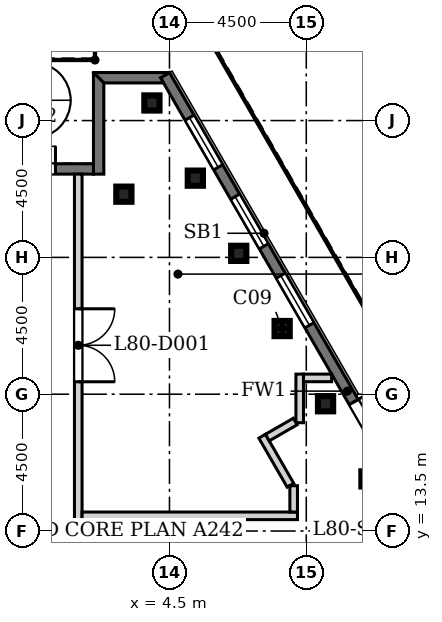
"""IFC4 building model, lengths in metres.
Left out: names, types, materials, properties, quantities, classifications, styles, units other than length and angle.
Written with IfcOpenShell. Run it as: python <this file> out.ifc"""

import sys

from ifc_helpers import new_model, si_unit, direction, frame, frame_2d, origin, origin_2d, place, context, subcontext, project, spatial, polyline, rectangle, hollow_rectangle, outline, extrude, element, fill, save


model = new_model("IFC4")
c1 = context("Model", 3, precision=1e-05, world=origin(), true_north=direction((0.0, 1.0)))
c2 = subcontext(c1, "Body", "Model", "MODEL_VIEW")
j1 = project(units=[si_unit("LENGTHUNIT", "METRE"), si_unit("PLANEANGLEUNIT", "RADIAN")], contexts=[c1])
p1 = place(None, origin())
s1 = spatial("IfcSite", under=j1, at=p1, CompositionType="ELEMENT")
p2 = place(p1, origin())
s2 = spatial("IfcBuilding", under=s1, at=p2, CompositionType="ELEMENT")
p3 = place(p2, frame((0.0, 0.0, 355.1)))
s3 = spatial("IfcBuildingStorey", under=s2, at=p3, CompositionType="ELEMENT", Elevation=355.1)
for number, where, z_axis, x_axis in (
    (1, (11.062, 15.213, 0.0), (0.0, 0.0, 1.0), (1.0, 0.0, 0.0)),
    (2, (9.634, 17.687, 0.0), (0.0, 0.0, 1.0), (1.0, 0.0, 0.0)),
    (3, (8.206, 20.16, 0.0), (0.0, 0.0, 1.0), (1.0, 0.0, 0.0)),
    (4, (6.778, 22.633, 0.0), (0.0, 0.0, 1.0), (1.0, 0.0, 0.0)),
    (5, (5.351, 25.106, 0.0), (0.0, 0.0, 1.0), (1.0, 0.0, 0.0)),
    (6, (3.923, 27.579, 0.0), (0.0, 0.0, 1.0), (1.0, 0.0, 0.0)),
    (7, (3.0, 24.579, 0.0), (0.0, 0.0, 1.0), (1.0, 0.0, 0.0)),
):
    element("IfcColumn", number, at=place(p3, frame(where, z_axis=z_axis, x_axis=x_axis)), inside=s3, PredefinedType="COLUMN", context=c2, shape_type="SweptSolid", body=[
        extrude(hollow_rectangle(XDim=0.5, YDim=0.5, WallThickness=0.025, at=origin_2d()), origin(), (0.0, 0.0, 1.0), 3.9),
    ])
p4 = place(p3, frame((16.353, 7.709, 0.0), z_axis=(0.0, 0.0, 1.0), x_axis=(-0.49999894854, 0.866026010844, 0.0)))
e8 = element("IfcWall", 8, at=p4, inside=s3, PredefinedType="SOLIDWALL", context=c2, shape_type="SweptSolid", body=[
    extrude(rectangle(XDim=24.0, YDim=0.34, at=frame_2d((12.0, 0.0))), origin(), (0.0, 0.0, 1.0), 3.9),
])
p5 = place(p4, frame((2.5, 0.0, 0.9)))
e9 = element("IfcOpeningElement", 9, at=p5, cuts=e8, PredefinedType="OPENING", context=c2, shape_type="SweptSolid", body=[
    extrude(rectangle(XDim=1.885, YDim=3.0, at=frame_2d((0.942, 1.5))), frame((0.0, 0.18, 0.0), z_axis=(0.0, -1.0, 0.0), x_axis=(1.0, 0.0, 0.0)), (0.0, 0.0, 1.0), 0.36),
])
p6 = place(p4, frame((5.5, 0.0, 0.9)))
e10 = element("IfcOpeningElement", 10, at=p6, cuts=e8, PredefinedType="OPENING", context=c2, shape_type="SweptSolid", body=[
    extrude(rectangle(XDim=1.885, YDim=3.0, at=frame_2d((0.942, 1.5))), frame((0.0, 0.18, 0.0), z_axis=(0.0, -1.0, 0.0), x_axis=(1.0, 0.0, 0.0)), (0.0, 0.0, 1.0), 0.36),
])
p7 = place(p4, frame((14.5, 0.0, 0.9)))
e11 = element("IfcOpeningElement", 11, at=p7, cuts=e8, PredefinedType="OPENING", context=c2, shape_type="SweptSolid", body=[
    extrude(rectangle(XDim=1.885, YDim=3.0, at=frame_2d((0.942, 1.5))), frame((0.0, 0.18, 0.0), z_axis=(0.0, -1.0, 0.0), x_axis=(1.0, 0.0, 0.0)), (0.0, 0.0, 1.0), 0.36),
])
p8 = place(p4, frame((17.5, 0.0, 0.9)))
e12 = element("IfcOpeningElement", 12, at=p8, cuts=e8, PredefinedType="OPENING", context=c2, shape_type="SweptSolid", body=[
    extrude(rectangle(XDim=1.885, YDim=3.0, at=frame_2d((0.942, 1.5))), frame((0.0, 0.18, 0.0), z_axis=(0.0, -1.0, 0.0), x_axis=(1.0, 0.0, 0.0)), (0.0, 0.0, 1.0), 0.36),
])
p9 = place(p4, frame((20.5, 0.0, 0.9)))
e13 = element("IfcOpeningElement", 13, at=p9, cuts=e8, PredefinedType="OPENING", context=c2, shape_type="SweptSolid", body=[
    extrude(rectangle(XDim=1.885, YDim=3.0, at=frame_2d((0.942, 1.5))), frame((0.0, 0.18, 0.0), z_axis=(0.0, -1.0, 0.0), x_axis=(1.0, 0.0, 0.0)), (0.0, 0.0, 1.0), 0.36),
])
p10 = place(p4, frame((9.7, 0.0, 0.0)))
e14 = element("IfcOpeningElement", 14, at=p10, cuts=e8, PredefinedType="OPENING", context=c2, shape_type="SweptSolid", body=[
    extrude(rectangle(XDim=1.885, YDim=2.6, at=frame_2d((0.942, 1.3))), frame((0.0, 0.18, 0.0), z_axis=(0.0, -1.0, 0.0), x_axis=(1.0, 0.0, 0.0)), (0.0, 0.0, 1.0), 0.36),
])
p11 = place(p3, origin())
e15 = element("IfcWall", 15, at=p11, inside=s3, PredefinedType="SOLIDWALL", context=c2, shape_type="SweptSolid", body=[
    extrude(outline(polyline([(1.999, 28.579), (4.501, 28.579), (4.501, 28.579), (4.206, 28.409), (4.305, 28.238), (2.34, 28.238), (1.999, 28.579), (1.999, 28.579)])), origin(), (0.0, 0.0, 1.0), 3.9),
])
p12 = place(p3, origin())
e16 = element("IfcWall", 16, at=p12, inside=s3, PredefinedType="SOLIDWALL", context=c2, shape_type="SweptSolid", body=[
    extrude(outline(polyline([(2.341, 25.238), (2.0, 25.238), (2.0, 28.58), (2.0, 28.58), (2.341, 28.239), (2.341, 25.238)])), origin(), (0.0, 0.0, 1.0), 3.9),
])
p13 = place(p3, frame((2.0, 25.409, 0.0), z_axis=(0.0, 0.0, 1.0), x_axis=(-1.0, 0.0, 0.0)))
e17 = element("IfcWall", 17, at=p13, inside=s3, PredefinedType="SOLIDWALL", context=c2, shape_type="SweptSolid", body=[
    extrude(rectangle(XDim=4.0, YDim=0.34, at=frame_2d((2.0, 0.0))), origin(), (0.0, 0.0, 1.0), 3.9),
])
p14 = place(p13, frame((1.25, 0.0, 0.0)))
e18 = element("IfcOpeningElement", 18, at=p14, cuts=e17, PredefinedType="OPENING", context=c2, shape_type="SweptSolid", body=[
    extrude(rectangle(XDim=1.5, YDim=2.4, at=frame_2d((0.75, 1.2))), frame((0.0, 0.18, 0.0), z_axis=(0.0, -1.0, 0.0), x_axis=(1.0, 0.0, 0.0)), (0.0, 0.0, 1.0), 0.36),
])
p15 = place(p3, frame((1.5, 25.239, 0.0), z_axis=(0.0, 0.0, 1.0), x_axis=(0.0, -1.0, 0.0)))
e19 = element("IfcWall", 19, at=p15, inside=s3, PredefinedType="SOLIDWALL", context=c2, shape_type="SweptSolid", body=[
    extrude(rectangle(XDim=11.364, YDim=0.25, at=frame_2d((5.682, 0.0))), origin(), (0.0, 0.0, 1.0), 3.9),
])
p16 = place(p15, frame((4.429, 0.0, 0.0)))
e20 = element("IfcOpeningElement", 20, at=p16, cuts=e19, PredefinedType="OPENING", context=c2, shape_type="SweptSolid", body=[
    extrude(rectangle(XDim=2.4, YDim=2.4, at=frame_2d((1.2, 1.2))), frame((0.0, 0.135, 0.0), z_axis=(0.0, -1.0, 0.0), x_axis=(1.0, 0.0, 0.0)), (0.0, 0.0, 1.0), 0.27),
])
p17 = place(p3, frame((1.625, 14.0, 0.0), z_axis=(0.0, 0.0, 1.0), x_axis=(1.0, 0.0, 0.0)))
e21 = element("IfcWall", 21, at=p17, inside=s3, PredefinedType="SOLIDWALL", context=c2, shape_type="SweptSolid", body=[
    extrude(rectangle(XDim=7.085, YDim=0.25, at=frame_2d((3.542, 0.0))), origin(), (0.0, 0.0, 1.0), 3.9),
])
p18 = place(p3, frame((8.481, 15.004, 0.0), z_axis=(0.0, 0.0, 1.0), x_axis=(-0.500111732142, 0.865960885591, 0.0)))
e22 = element("IfcWall", 22, at=p18, inside=s3, PredefinedType="SOLIDWALL", context=c2, shape_type="SweptSolid", body=[
    extrude(rectangle(XDim=1.864, YDim=0.25, at=frame_2d((0.932, 0.0))), origin(), (0.0, 0.0, 1.0), 3.9),
])
p19 = place(p3, frame((8.784, 17.062, 0.0), z_axis=(0.0, 0.0, 1.0), x_axis=(0.0, 1.0, 0.0)))
e23 = element("IfcWall", 23, at=p19, inside=s3, PredefinedType="SOLIDWALL", context=c2, shape_type="SweptSolid", body=[
    extrude(rectangle(XDim=1.6, YDim=0.25, at=frame_2d((0.8, 0.0))), origin(), (0.0, 0.0, 1.0), 3.9),
])
p20 = place(p3, frame((7.719, 16.573, 0.0), z_axis=(0.0, 0.0, 1.0), x_axis=(0.865962759392, 0.500108487576, 0.0)))
e24 = element("IfcWall", 24, at=p20, inside=s3, PredefinedType="SOLIDWALL", context=c2, shape_type="SweptSolid", body=[
    extrude(rectangle(XDim=1.058, YDim=0.25, at=frame_2d((0.529, 0.0))), origin(), (0.0, 0.0, 1.0), 3.9),
])
p21 = place(p3, frame((8.909, 18.537, 0.0), z_axis=(0.0, 0.0, 1.0), x_axis=(1.0, 0.0, 0.0)))
e25 = element("IfcWall", 25, at=p21, inside=s3, PredefinedType="SOLIDWALL", context=c2, shape_type="SweptSolid", body=[
    extrude(rectangle(XDim=0.924, YDim=0.25, at=frame_2d((0.462, 0.0))), origin(), (0.0, 0.0, 1.0), 3.9),
])
p22 = place(p3, frame((8.585, 14.125, 0.0), z_axis=(0.0, 0.0, 1.0), x_axis=(0.0, 1.0, 0.0)))
e26 = element("IfcWall", 26, at=p22, inside=s3, PredefinedType="SOLIDWALL", context=c2, shape_type="SweptSolid", body=[
    extrude(rectangle(XDim=0.865, YDim=0.25, at=frame_2d((0.432, 0.0))), origin(), (0.0, 0.0, 1.0), 3.9),
])
p23 = place(p7, origin())
e27 = element("IfcWindow", 27, at=p23, inside=s3, PartitioningType="SINGLE_PANEL", PredefinedType="WINDOW", context=c2, shape_type="SweptSolid", body=[
    extrude(rectangle(XDim=1.885, YDim=3.0, at=frame_2d((0.942, 1.5))), frame((0.0, 0.11, 0.0), z_axis=(0.0, -1.0, 0.0), x_axis=(1.0, 0.0, 0.0)), (0.0, 0.0, 1.0), 0.06),
])
fill(e11, e27)
p24 = place(p8, origin())
e28 = element("IfcWindow", 28, at=p24, inside=s3, PartitioningType="SINGLE_PANEL", PredefinedType="WINDOW", context=c2, shape_type="SweptSolid", body=[
    extrude(rectangle(XDim=1.885, YDim=3.0, at=frame_2d((0.942, 1.5))), frame((0.0, 0.11, 0.0), z_axis=(0.0, -1.0, 0.0), x_axis=(1.0, 0.0, 0.0)), (0.0, 0.0, 1.0), 0.06),
])
fill(e12, e28)
p25 = place(p9, origin())
e29 = element("IfcWindow", 29, at=p25, inside=s3, PartitioningType="SINGLE_PANEL", PredefinedType="WINDOW", context=c2, shape_type="SweptSolid", body=[
    extrude(rectangle(XDim=1.885, YDim=3.0, at=frame_2d((0.942, 1.5))), frame((0.0, 0.11, 0.0), z_axis=(0.0, -1.0, 0.0), x_axis=(1.0, 0.0, 0.0)), (0.0, 0.0, 1.0), 0.06),
])
fill(e13, e29)
p26 = place(p10, frame((1.885, 0.0, 0.0), z_axis=(0.0, 0.0, 1.0), x_axis=(-1.0, 0.0, 0.0)))
e30 = element("IfcDoor", 30, at=p26, inside=s3, OperationType="DOUBLE_DOOR_SINGLE_SWING", PredefinedType="DOOR", context=c2, shape_type="SweptSolid", body=[
    extrude(rectangle(XDim=1.885, YDim=2.6, at=frame_2d((0.942, 1.3))), frame((0.0, 0.025, 0.0), z_axis=(0.0, -1.0, 0.0), x_axis=(1.0, 0.0, 0.0)), (0.0, 0.0, 1.0), 0.05),
])
fill(e14, e30)
p27 = place(p14, frame((1.5, 0.0, 0.0), z_axis=(0.0, 0.0, 1.0), x_axis=(-1.0, 0.0, 0.0)))
e31 = element("IfcDoor", 31, at=p27, inside=s3, OperationType="DOUBLE_DOOR_SINGLE_SWING", PredefinedType="DOOR", context=c2, shape_type="SweptSolid", body=[
    extrude(rectangle(XDim=1.5, YDim=2.4, at=frame_2d((0.75, 1.2))), frame((0.0, 0.025, 0.0), z_axis=(0.0, -1.0, 0.0), x_axis=(1.0, 0.0, 0.0)), (0.0, 0.0, 1.0), 0.05),
])
fill(e18, e31)
p28 = place(p16, origin())
e32 = element("IfcDoor", 32, at=p28, inside=s3, OperationType="DOUBLE_DOOR_SINGLE_SWING", PredefinedType="DOOR", context=c2, shape_type="SweptSolid", body=[
    extrude(rectangle(XDim=2.4, YDim=2.4, at=frame_2d((1.2, 1.2))), frame((0.0, 0.025, 0.0), z_axis=(0.0, -1.0, 0.0), x_axis=(1.0, 0.0, 0.0)), (0.0, 0.0, 1.0), 0.05),
])
fill(e20, e32)
save(model, sys.argv[1])
